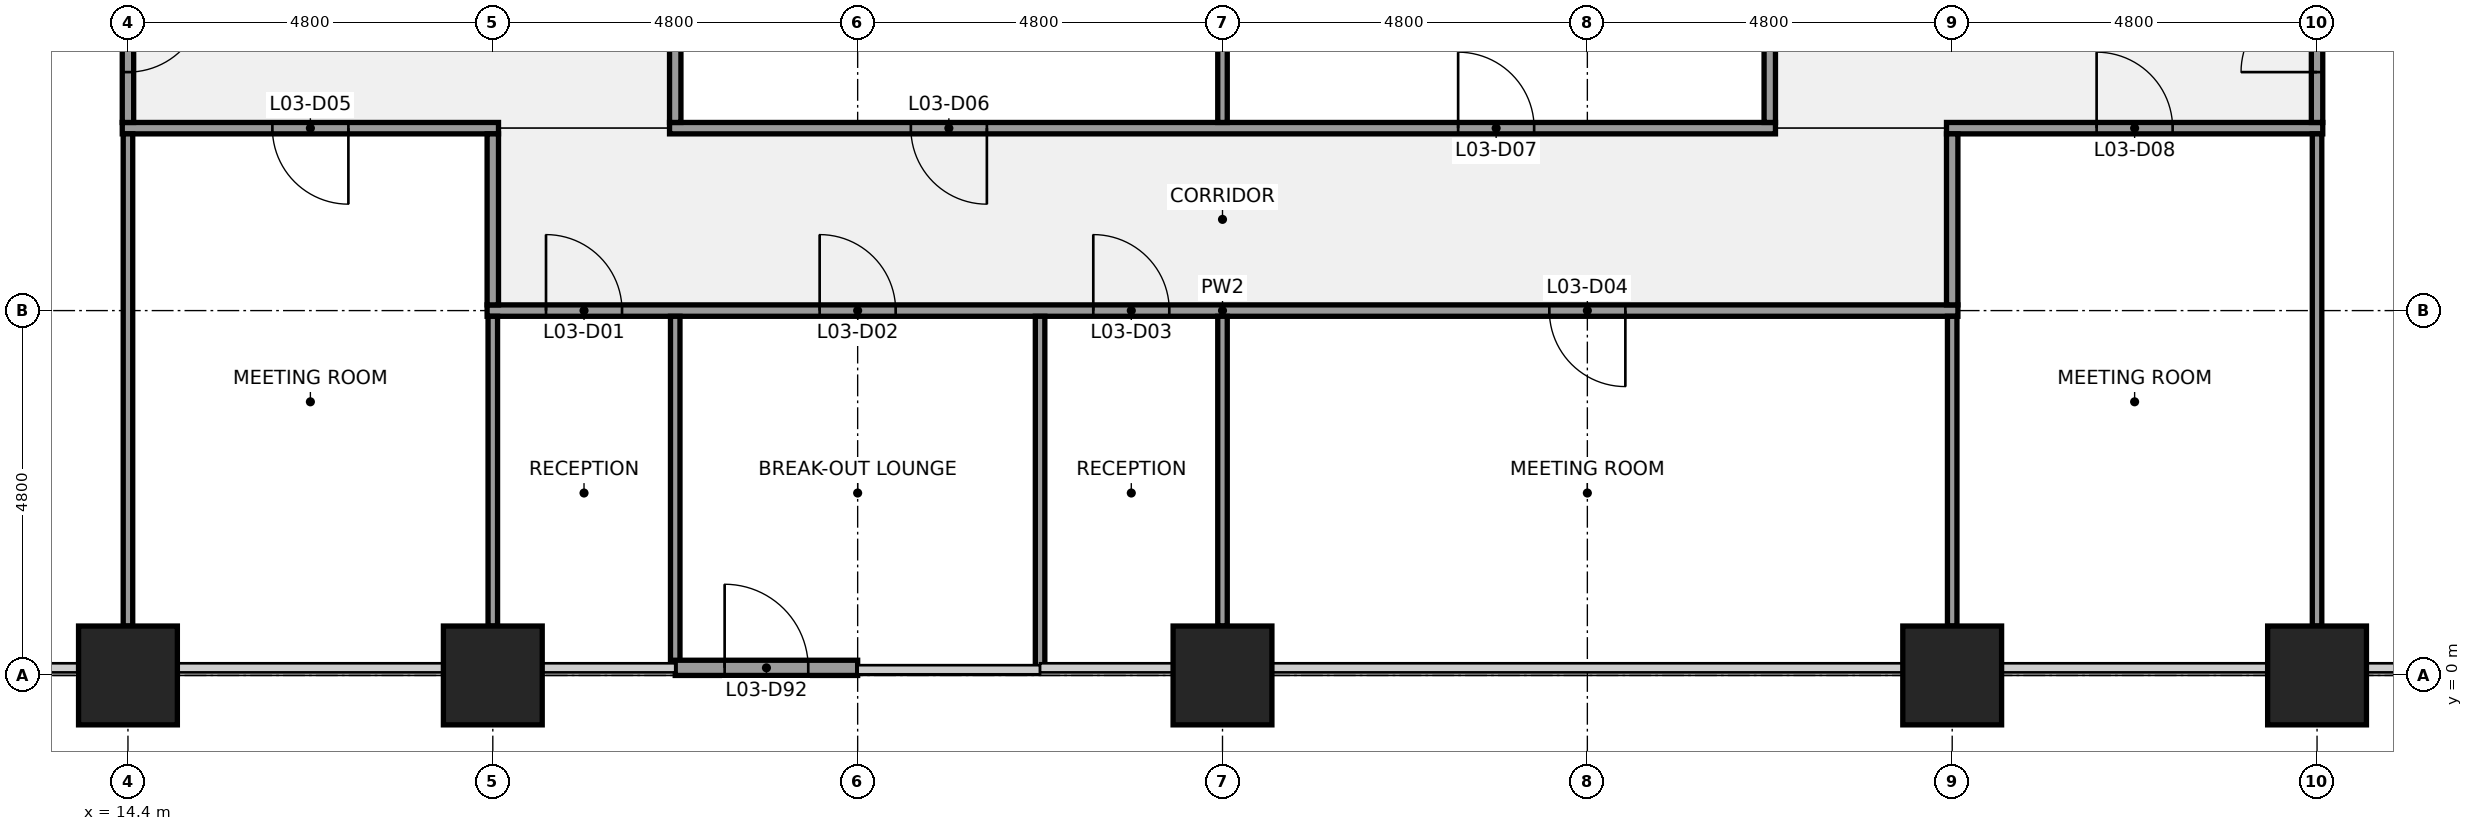
"""IFC4 building model, lengths in metres.
Left out: names, types, materials, properties, quantities, classifications, styles, units other than length and angle.
Written with IfcOpenShell. Run it as: python <this file> out.ifc"""

import sys

from ifc_helpers import new_model, si_unit, direction, frame, frame_2d, origin, origin_2d, place, context, subcontext, project, spatial, rectangle, extrude, element, fill, save


model = new_model("IFC4")
c1 = context("Model", 3, precision=1e-05, world=origin(), true_north=direction((0.0, 1.0)))
c2 = subcontext(c1, "Body", "Model", "MODEL_VIEW")
j1 = project(units=[si_unit("LENGTHUNIT", "METRE"), si_unit("PLANEANGLEUNIT", "RADIAN")], contexts=[c1])
p1 = place(None, origin())
s1 = spatial("IfcSite", under=j1, at=p1, CompositionType="ELEMENT")
p2 = place(p1, origin())
s2 = spatial("IfcBuilding", under=s1, at=p2, CompositionType="ELEMENT")
p3 = place(p2, frame((0.0, 0.0, 21.4)))
s3 = spatial("IfcBuildingStorey", under=s2, at=p3, CompositionType="ELEMENT", Elevation=21.4)
for number, where, z_axis, x_axis in (
    (1, (14.4, 0.0, 0.0), (0.0, 0.0, 1.0), (1.0, 0.0, 0.0)),
    (2, (19.2, 0.0, 0.0), (0.0, 0.0, 1.0), (1.0, 0.0, 0.0)),
    (3, (28.8, 0.0, 0.0), (0.0, 0.0, 1.0), (1.0, 0.0, 0.0)),
    (4, (38.4, 0.0, 0.0), (0.0, 0.0, 1.0), (1.0, 0.0, 0.0)),
    (5, (43.2, 0.0, 0.0), (0.0, 0.0, 1.0), (1.0, 0.0, 0.0)),
):
    element("IfcColumn", number, at=place(p3, frame(where, z_axis=z_axis, x_axis=x_axis)), inside=s3, PredefinedType="COLUMN", context=c2, shape_type="SweptSolid", body=[
        extrude(rectangle(XDim=1.3, YDim=1.3, at=origin_2d()), origin(), (0.0, 0.0, 1.0), 4.4),
    ])
p4 = place(p3, frame((19.125, 4.8, 0.0), z_axis=(0.0, 0.0, 1.0), x_axis=(1.0, 0.0, 0.0)))
e6 = element("IfcWall", 6, at=p4, inside=s3, PredefinedType="PARTITIONING", context=c2, shape_type="SweptSolid", body=[
    extrude(rectangle(XDim=19.35, YDim=0.15, at=frame_2d((9.675, 0.0))), origin(), (0.0, 0.0, 1.0), 3.27),
])
p5 = place(p4, frame((0.775, 0.0, 0.0)))
e7 = element("IfcOpeningElement", 7, at=p5, cuts=e6, PredefinedType="OPENING", context=c2, shape_type="SweptSolid", body=[
    extrude(rectangle(XDim=1.0, YDim=2.1, at=frame_2d((0.5, 1.05))), frame((0.0, 0.085, 0.0), z_axis=(0.0, -1.0, 0.0), x_axis=(1.0, 0.0, 0.0)), (0.0, 0.0, 1.0), 0.17),
])
p6 = place(p4, frame((4.375, 0.0, 0.0)))
e8 = element("IfcOpeningElement", 8, at=p6, cuts=e6, PredefinedType="OPENING", context=c2, shape_type="SweptSolid", body=[
    extrude(rectangle(XDim=1.0, YDim=2.1, at=frame_2d((0.5, 1.05))), frame((0.0, 0.085, 0.0), z_axis=(0.0, -1.0, 0.0), x_axis=(1.0, 0.0, 0.0)), (0.0, 0.0, 1.0), 0.17),
])
p7 = place(p4, frame((7.975, 0.0, 0.0)))
e9 = element("IfcOpeningElement", 9, at=p7, cuts=e6, PredefinedType="OPENING", context=c2, shape_type="SweptSolid", body=[
    extrude(rectangle(XDim=1.0, YDim=2.1, at=frame_2d((0.5, 1.05))), frame((0.0, 0.085, 0.0), z_axis=(0.0, -1.0, 0.0), x_axis=(1.0, 0.0, 0.0)), (0.0, 0.0, 1.0), 0.17),
])
p8 = place(p4, frame((13.975, 0.0, 0.0)))
e10 = element("IfcOpeningElement", 10, at=p8, cuts=e6, PredefinedType="OPENING", context=c2, shape_type="SweptSolid", body=[
    extrude(rectangle(XDim=1.0, YDim=2.1, at=frame_2d((0.5, 1.05))), frame((0.0, 0.085, 0.0), z_axis=(0.0, -1.0, 0.0), x_axis=(1.0, 0.0, 0.0)), (0.0, 0.0, 1.0), 0.17),
])
p9 = place(p3, frame((14.325, 7.2, 0.0), z_axis=(0.0, 0.0, 1.0), x_axis=(1.0, 0.0, 0.0)))
e11 = element("IfcWall", 11, at=p9, inside=s3, PredefinedType="PARTITIONING", context=c2, shape_type="SweptSolid", body=[
    extrude(rectangle(XDim=4.95, YDim=0.15, at=frame_2d((2.475, 0.0))), origin(), (0.0, 0.0, 1.0), 3.27),
])
p10 = place(p9, frame((1.975, 0.0, 0.0)))
e12 = element("IfcOpeningElement", 12, at=p10, cuts=e11, PredefinedType="OPENING", context=c2, shape_type="SweptSolid", body=[
    extrude(rectangle(XDim=1.0, YDim=2.1, at=frame_2d((0.5, 1.05))), frame((0.0, 0.085, 0.0), z_axis=(0.0, -1.0, 0.0), x_axis=(1.0, 0.0, 0.0)), (0.0, 0.0, 1.0), 0.17),
])
p11 = place(p3, frame((21.525, 7.2, 0.0), z_axis=(0.0, 0.0, 1.0), x_axis=(1.0, 0.0, 0.0)))
e13 = element("IfcWall", 13, at=p11, inside=s3, PredefinedType="PARTITIONING", context=c2, shape_type="SweptSolid", body=[
    extrude(rectangle(XDim=14.55, YDim=0.15, at=frame_2d((7.275, 0.0))), origin(), (0.0, 0.0, 1.0), 3.27),
])
p12 = place(p11, frame((3.175, 0.0, 0.0)))
e14 = element("IfcOpeningElement", 14, at=p12, cuts=e13, PredefinedType="OPENING", context=c2, shape_type="SweptSolid", body=[
    extrude(rectangle(XDim=1.0, YDim=2.1, at=frame_2d((0.5, 1.05))), frame((0.0, 0.085, 0.0), z_axis=(0.0, -1.0, 0.0), x_axis=(1.0, 0.0, 0.0)), (0.0, 0.0, 1.0), 0.17),
])
p13 = place(p11, frame((10.375, 0.0, 0.0)))
e15 = element("IfcOpeningElement", 15, at=p13, cuts=e13, PredefinedType="OPENING", context=c2, shape_type="SweptSolid", body=[
    extrude(rectangle(XDim=1.0, YDim=2.1, at=frame_2d((0.5, 1.05))), frame((0.0, 0.085, 0.0), z_axis=(0.0, -1.0, 0.0), x_axis=(1.0, 0.0, 0.0)), (0.0, 0.0, 1.0), 0.17),
])
p14 = place(p3, frame((38.325, 7.2, 0.0), z_axis=(0.0, 0.0, 1.0), x_axis=(1.0, 0.0, 0.0)))
e16 = element("IfcWall", 16, at=p14, inside=s3, PredefinedType="PARTITIONING", context=c2, shape_type="SweptSolid", body=[
    extrude(rectangle(XDim=4.95, YDim=0.15, at=frame_2d((2.475, 0.0))), origin(), (0.0, 0.0, 1.0), 3.27),
])
p15 = place(p14, frame((1.975, 0.0, 0.0)))
e17 = element("IfcOpeningElement", 17, at=p15, cuts=e16, PredefinedType="OPENING", context=c2, shape_type="SweptSolid", body=[
    extrude(rectangle(XDim=1.0, YDim=2.1, at=frame_2d((0.5, 1.05))), frame((0.0, 0.085, 0.0), z_axis=(0.0, -1.0, 0.0), x_axis=(1.0, 0.0, 0.0)), (0.0, 0.0, 1.0), 0.17),
])
p16 = place(p3, frame((14.4, 0.65, 0.0), z_axis=(0.0, 0.0, 1.0), x_axis=(0.0, 1.0, 0.0)))
e18 = element("IfcWall", 18, at=p16, inside=s3, PredefinedType="PARTITIONING", context=c2, shape_type="SweptSolid", body=[
    extrude(rectangle(XDim=6.475, YDim=0.125, at=frame_2d((3.238, 0.0))), origin(), (0.0, 0.0, 1.0), 3.27),
])
p17 = place(p3, frame((14.4, 7.275, 0.0), z_axis=(0.0, 0.0, 1.0), x_axis=(0.0, 1.0, 0.0)))
e19 = element("IfcWall", 19, at=p17, inside=s3, PredefinedType="PARTITIONING", context=c2, shape_type="SweptSolid", body=[
    extrude(rectangle(XDim=2.325, YDim=0.15, at=frame_2d((1.163, 0.0))), origin(), (0.0, 0.0, 1.0), 3.27),
])
p18 = place(p17, frame((0.663, 0.0, 0.0)))
e20 = element("IfcOpeningElement", 20, at=p18, cuts=e19, PredefinedType="OPENING", context=c2, shape_type="SweptSolid", body=[
    extrude(rectangle(XDim=1.0, YDim=2.1, at=frame_2d((0.5, 1.05))), frame((0.0, 0.085, 0.0), z_axis=(0.0, -1.0, 0.0), x_axis=(1.0, 0.0, 0.0)), (0.0, 0.0, 1.0), 0.17),
])
p19 = place(p3, frame((19.2, 0.65, 0.0), z_axis=(0.0, 0.0, 1.0), x_axis=(0.0, 1.0, 0.0)))
e21 = element("IfcWall", 21, at=p19, inside=s3, PredefinedType="PARTITIONING", context=c2, shape_type="SweptSolid", body=[
    extrude(rectangle(XDim=4.075, YDim=0.125, at=frame_2d((2.038, 0.0))), origin(), (0.0, 0.0, 1.0), 3.27),
])
p20 = place(p3, frame((19.2, 4.875, 0.0), z_axis=(0.0, 0.0, 1.0), x_axis=(0.0, 1.0, 0.0)))
e22 = element("IfcWall", 22, at=p20, inside=s3, PredefinedType="PARTITIONING", context=c2, shape_type="SweptSolid", body=[
    extrude(rectangle(XDim=2.25, YDim=0.15, at=frame_2d((1.125, 0.0))), origin(), (0.0, 0.0, 1.0), 3.27),
])
p21 = place(p3, frame((21.6, 0.1, 0.0), z_axis=(0.0, 0.0, 1.0), x_axis=(0.0, 1.0, 0.0)))
e23 = element("IfcWall", 23, at=p21, inside=s3, PredefinedType="PARTITIONING", context=c2, shape_type="SweptSolid", body=[
    extrude(rectangle(XDim=4.625, YDim=0.125, at=frame_2d((2.312, 0.0))), origin(), (0.0, 0.0, 1.0), 3.27),
])
p22 = place(p3, frame((21.6, 7.275, 0.0), z_axis=(0.0, 0.0, 1.0), x_axis=(0.0, 1.0, 0.0)))
e24 = element("IfcWall", 24, at=p22, inside=s3, PredefinedType="PARTITIONING", context=c2, shape_type="SweptSolid", body=[
    extrude(rectangle(XDim=2.263, YDim=0.15, at=frame_2d((1.131, 0.0))), origin(), (0.0, 0.0, 1.0), 3.27),
])
p23 = place(p3, frame((26.4, 0.1, 0.0), z_axis=(0.0, 0.0, 1.0), x_axis=(0.0, 1.0, 0.0)))
e25 = element("IfcWall", 25, at=p23, inside=s3, PredefinedType="PARTITIONING", context=c2, shape_type="SweptSolid", body=[
    extrude(rectangle(XDim=4.625, YDim=0.125, at=frame_2d((2.312, 0.0))), origin(), (0.0, 0.0, 1.0), 3.27),
])
p24 = place(p3, frame((28.8, 0.65, 0.0), z_axis=(0.0, 0.0, 1.0), x_axis=(0.0, 1.0, 0.0)))
e26 = element("IfcWall", 26, at=p24, inside=s3, PredefinedType="PARTITIONING", context=c2, shape_type="SweptSolid", body=[
    extrude(rectangle(XDim=4.075, YDim=0.125, at=frame_2d((2.038, 0.0))), origin(), (0.0, 0.0, 1.0), 3.27),
])
p25 = place(p3, frame((28.8, 7.275, 0.0), z_axis=(0.0, 0.0, 1.0), x_axis=(0.0, 1.0, 0.0)))
e27 = element("IfcWall", 27, at=p25, inside=s3, PredefinedType="PARTITIONING", context=c2, shape_type="SweptSolid", body=[
    extrude(rectangle(XDim=2.263, YDim=0.125, at=frame_2d((1.131, 0.0))), origin(), (0.0, 0.0, 1.0), 3.27),
])
p26 = place(p3, frame((36.0, 7.275, 0.0), z_axis=(0.0, 0.0, 1.0), x_axis=(0.0, 1.0, 0.0)))
e28 = element("IfcWall", 28, at=p26, inside=s3, PredefinedType="PARTITIONING", context=c2, shape_type="SweptSolid", body=[
    extrude(rectangle(XDim=2.263, YDim=0.15, at=frame_2d((1.131, 0.0))), origin(), (0.0, 0.0, 1.0), 3.27),
])
p27 = place(p3, frame((38.4, 0.65, 0.0), z_axis=(0.0, 0.0, 1.0), x_axis=(0.0, 1.0, 0.0)))
e29 = element("IfcWall", 29, at=p27, inside=s3, PredefinedType="PARTITIONING", context=c2, shape_type="SweptSolid", body=[
    extrude(rectangle(XDim=4.075, YDim=0.125, at=frame_2d((2.038, 0.0))), origin(), (0.0, 0.0, 1.0), 3.27),
])
p28 = place(p3, frame((38.4, 4.875, 0.0), z_axis=(0.0, 0.0, 1.0), x_axis=(0.0, 1.0, 0.0)))
e30 = element("IfcWall", 30, at=p28, inside=s3, PredefinedType="PARTITIONING", context=c2, shape_type="SweptSolid", body=[
    extrude(rectangle(XDim=2.25, YDim=0.15, at=frame_2d((1.125, 0.0))), origin(), (0.0, 0.0, 1.0), 3.27),
])
p29 = place(p3, frame((43.2, 0.65, 0.0), z_axis=(0.0, 0.0, 1.0), x_axis=(0.0, 1.0, 0.0)))
e31 = element("IfcWall", 31, at=p29, inside=s3, PredefinedType="PARTITIONING", context=c2, shape_type="SweptSolid", body=[
    extrude(rectangle(XDim=6.475, YDim=0.125, at=frame_2d((3.238, 0.0))), origin(), (0.0, 0.0, 1.0), 3.27),
])
p30 = place(p3, frame((43.2, 7.275, 0.0), z_axis=(0.0, 0.0, 1.0), x_axis=(0.0, 1.0, 0.0)))
e32 = element("IfcWall", 32, at=p30, inside=s3, PredefinedType="PARTITIONING", context=c2, shape_type="SweptSolid", body=[
    extrude(rectangle(XDim=2.325, YDim=0.15, at=frame_2d((1.163, 0.0))), origin(), (0.0, 0.0, 1.0), 3.27),
])
p31 = place(p30, frame((0.663, 0.0, 0.0)))
e33 = element("IfcOpeningElement", 33, at=p31, cuts=e32, PredefinedType="OPENING", context=c2, shape_type="SweptSolid", body=[
    extrude(rectangle(XDim=1.0, YDim=2.1, at=frame_2d((0.5, 1.05))), frame((0.0, 0.085, 0.0), z_axis=(0.0, -1.0, 0.0), x_axis=(1.0, 0.0, 0.0)), (0.0, 0.0, 1.0), 0.17),
])
p32 = place(p3, frame((21.6, 0.1, 0.0), z_axis=(0.0, 0.0, 1.0), x_axis=(1.0, 0.0, 0.0)))
e34 = element("IfcWall", 34, at=p32, inside=s3, PredefinedType="SOLIDWALL", context=c2, shape_type="SweptSolid", body=[
    extrude(rectangle(XDim=2.4, YDim=0.2, at=frame_2d((1.2, 0.0))), origin(), (0.0, 0.0, 1.0), 3.714),
])
p33 = place(p32, frame((0.65, 0.0, 0.0)))
e35 = element("IfcOpeningElement", 35, at=p33, cuts=e34, PredefinedType="OPENING", context=c2, shape_type="SweptSolid", body=[
    extrude(rectangle(XDim=1.1, YDim=2.1, at=frame_2d((0.55, 1.05))), frame((0.0, 0.11, 0.0), z_axis=(0.0, -1.0, 0.0), x_axis=(1.0, 0.0, 0.0)), (0.0, 0.0, 1.0), 0.22),
])
for number, where, z_axis, x_axis in (
    (36, (14.4, -1.075, 0.0), (0.0, 0.0, 1.0), (1.0, 0.0, 0.0)),
    (37, (19.2, -1.075, 0.0), (0.0, 0.0, 1.0), (1.0, 0.0, 0.0)),
    (38, (38.4, -1.075, 0.0), (0.0, 0.0, 1.0), (1.0, 0.0, 0.0)),
    (39, (43.2, -1.075, 0.0), (0.0, 0.0, 1.0), (1.0, 0.0, 0.0)),
):
    element("IfcColumn", number, at=place(p3, frame(where, z_axis=z_axis, x_axis=x_axis)), inside=s3, PredefinedType="PILASTER", context=c2, shape_type="SweptSolid", body=[
        extrude(rectangle(XDim=4.2, YDim=0.85, at=origin_2d()), origin(), (0.0, 0.0, 1.0), 4.4),
    ])
p34 = place(p5, origin())
e40 = element("IfcDoor", 40, at=p34, inside=s3, OperationType="SINGLE_SWING_LEFT", PredefinedType="DOOR", context=c2, shape_type="SweptSolid", body=[
    extrude(rectangle(XDim=1.0, YDim=2.1, at=frame_2d((0.5, 1.05))), frame((0.0, 0.025, 0.0), z_axis=(0.0, -1.0, 0.0), x_axis=(1.0, 0.0, 0.0)), (0.0, 0.0, 1.0), 0.05),
])
fill(e7, e40)
p35 = place(p6, origin())
e41 = element("IfcDoor", 41, at=p35, inside=s3, OperationType="SINGLE_SWING_LEFT", PredefinedType="DOOR", context=c2, shape_type="SweptSolid", body=[
    extrude(rectangle(XDim=1.0, YDim=2.1, at=frame_2d((0.5, 1.05))), frame((0.0, 0.025, 0.0), z_axis=(0.0, -1.0, 0.0), x_axis=(1.0, 0.0, 0.0)), (0.0, 0.0, 1.0), 0.05),
])
fill(e8, e41)
p36 = place(p7, origin())
e42 = element("IfcDoor", 42, at=p36, inside=s3, OperationType="SINGLE_SWING_LEFT", PredefinedType="DOOR", context=c2, shape_type="SweptSolid", body=[
    extrude(rectangle(XDim=1.0, YDim=2.1, at=frame_2d((0.5, 1.05))), frame((0.0, 0.025, 0.0), z_axis=(0.0, -1.0, 0.0), x_axis=(1.0, 0.0, 0.0)), (0.0, 0.0, 1.0), 0.05),
])
fill(e9, e42)
p37 = place(p8, origin())
e43 = element("IfcDoor", 43, at=p37, inside=s3, OperationType="SINGLE_SWING_RIGHT", PredefinedType="DOOR", context=c2, shape_type="SweptSolid", body=[
    extrude(rectangle(XDim=1.0, YDim=2.1, at=frame_2d((0.5, 1.05))), frame((0.0, 0.025, 0.0), z_axis=(0.0, -1.0, 0.0), x_axis=(1.0, 0.0, 0.0)), (0.0, 0.0, 1.0), 0.05),
])
fill(e10, e43)
p38 = place(p10, origin())
e44 = element("IfcDoor", 44, at=p38, inside=s3, OperationType="SINGLE_SWING_RIGHT", PredefinedType="DOOR", context=c2, shape_type="SweptSolid", body=[
    extrude(rectangle(XDim=1.0, YDim=2.1, at=frame_2d((0.5, 1.05))), frame((0.0, 0.025, 0.0), z_axis=(0.0, -1.0, 0.0), x_axis=(1.0, 0.0, 0.0)), (0.0, 0.0, 1.0), 0.05),
])
fill(e12, e44)
p39 = place(p12, origin())
e45 = element("IfcDoor", 45, at=p39, inside=s3, OperationType="SINGLE_SWING_RIGHT", PredefinedType="DOOR", context=c2, shape_type="SweptSolid", body=[
    extrude(rectangle(XDim=1.0, YDim=2.1, at=frame_2d((0.5, 1.05))), frame((0.0, 0.025, 0.0), z_axis=(0.0, -1.0, 0.0), x_axis=(1.0, 0.0, 0.0)), (0.0, 0.0, 1.0), 0.05),
])
fill(e14, e45)
p40 = place(p13, origin())
e46 = element("IfcDoor", 46, at=p40, inside=s3, OperationType="SINGLE_SWING_LEFT", PredefinedType="DOOR", context=c2, shape_type="SweptSolid", body=[
    extrude(rectangle(XDim=1.0, YDim=2.1, at=frame_2d((0.5, 1.05))), frame((0.0, 0.025, 0.0), z_axis=(0.0, -1.0, 0.0), x_axis=(1.0, 0.0, 0.0)), (0.0, 0.0, 1.0), 0.05),
])
fill(e15, e46)
p41 = place(p15, origin())
e47 = element("IfcDoor", 47, at=p41, inside=s3, OperationType="SINGLE_SWING_LEFT", PredefinedType="DOOR", context=c2, shape_type="SweptSolid", body=[
    extrude(rectangle(XDim=1.0, YDim=2.1, at=frame_2d((0.5, 1.05))), frame((0.0, 0.025, 0.0), z_axis=(0.0, -1.0, 0.0), x_axis=(1.0, 0.0, 0.0)), (0.0, 0.0, 1.0), 0.05),
])
fill(e17, e47)
p42 = place(p18, origin())
e48 = element("IfcDoor", 48, at=p42, inside=s3, OperationType="SINGLE_SWING_RIGHT", PredefinedType="DOOR", context=c2, shape_type="SweptSolid", body=[
    extrude(rectangle(XDim=1.0, YDim=2.1, at=frame_2d((0.5, 1.05))), frame((0.0, 0.025, 0.0), z_axis=(0.0, -1.0, 0.0), x_axis=(1.0, 0.0, 0.0)), (0.0, 0.0, 1.0), 0.05),
])
fill(e20, e48)
p43 = place(p31, origin())
e49 = element("IfcDoor", 49, at=p43, inside=s3, OperationType="SINGLE_SWING_LEFT", PredefinedType="DOOR", context=c2, shape_type="SweptSolid", body=[
    extrude(rectangle(XDim=1.0, YDim=2.1, at=frame_2d((0.5, 1.05))), frame((0.0, 0.025, 0.0), z_axis=(0.0, -1.0, 0.0), x_axis=(1.0, 0.0, 0.0)), (0.0, 0.0, 1.0), 0.05),
])
fill(e33, e49)
p44 = place(p33, origin())
e50 = element("IfcDoor", 50, at=p44, inside=s3, OperationType="SINGLE_SWING_LEFT", PredefinedType="DOOR", context=c2, shape_type="SweptSolid", body=[
    extrude(rectangle(XDim=1.1, YDim=2.1, at=frame_2d((0.55, 1.05))), frame((0.0, 0.025, 0.0), z_axis=(0.0, -1.0, 0.0), x_axis=(1.0, 0.0, 0.0)), (0.0, 0.0, 1.0), 0.05),
])
fill(e35, e50)
save(model, sys.argv[1])
